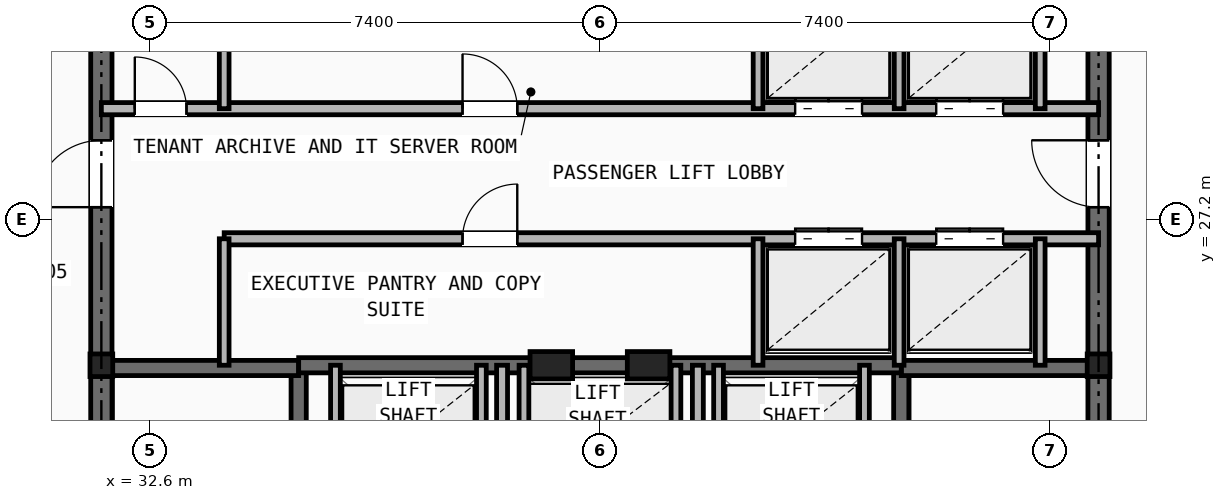
"""IFC4 building model, lengths in metres.
Left out: names, types, materials, properties, quantities, classifications, styles, units other than length and angle.
Written with IfcOpenShell. Run it as: python <this file> out.ifc"""

import sys

from ifc_helpers import new_model, si_unit, direction, frame, frame_2d, origin, origin_2d, place, context, subcontext, project, spatial, rectangle, i_section, extrude, element, fill, save


model = new_model("IFC4")
c1 = context("Model", 3, precision=1e-05, world=origin(), true_north=direction((0.0, 1.0)))
c2 = subcontext(c1, "Body", "Model", "MODEL_VIEW")
j1 = project(units=[si_unit("LENGTHUNIT", "METRE"), si_unit("PLANEANGLEUNIT", "RADIAN")], contexts=[c1])
p1 = place(None, origin())
s1 = spatial("IfcSite", under=j1, at=p1, CompositionType="ELEMENT")
p2 = place(p1, origin())
s2 = spatial("IfcBuilding", under=s1, at=p2, CompositionType="ELEMENT")
p3 = place(p2, frame((0.0, 0.0, 283.0)))
s3 = spatial("IfcBuildingStorey", under=s2, at=p3, CompositionType="ELEMENT", Elevation=283.0)
for number, where, z_axis, x_axis in (
    (1, (31.8, 24.8, 0.0), (0.0, 0.0, 1.0), (1.0, 0.0, 0.0)),
    (2, (48.2, 24.8, 0.0), (0.0, 0.0, 1.0), (1.0, 0.0, 0.0)),
):
    element("IfcColumn", number, at=place(p3, frame(where, z_axis=z_axis, x_axis=x_axis)), inside=s3, PredefinedType="COLUMN", context=c2, shape_type="SweptSolid", body=[
        extrude(i_section(OverallWidth=0.374, OverallDepth=0.372, WebThickness=0.016, FlangeThickness=0.026, at=origin_2d()), origin(), (0.0, 0.0, 1.0), 3.5),
    ])
for number, where, z_axis, x_axis in (
    (3, (39.2, 24.8, 0.0), (0.0, 0.0, 1.0), (1.0, 0.0, 0.0)),
    (4, (40.8, 24.8, 0.0), (0.0, 0.0, 1.0), (1.0, 0.0, 0.0)),
):
    element("IfcColumn", number, at=place(p3, frame(where, z_axis=z_axis, x_axis=x_axis)), inside=s3, PredefinedType="PILASTER", context=c2, shape_type="SweptSolid", body=[
        extrude(rectangle(XDim=0.7, YDim=0.45, at=origin_2d()), origin(), (0.0, 0.0, 1.0), 3.5),
    ])
p4 = place(p3, frame((31.8, 16.4, 0.0), z_axis=(0.0, 0.0, 1.0), x_axis=(0.0, 1.0, 0.0)))
e5 = element("IfcWall", 5, at=p4, inside=s3, PredefinedType="SHEAR", context=c2, shape_type="SweptSolid", body=[
    extrude(rectangle(XDim=14.8, YDim=0.35, at=frame_2d((7.4, 0.0))), origin(), (0.0, 0.0, 1.0), 3.25),
])
p5 = place(p4, frame((11.0, 0.0, 0.0)))
e6 = element("IfcOpeningElement", 6, at=p5, cuts=e5, PredefinedType="OPENING", context=c2, shape_type="SweptSolid", body=[
    extrude(rectangle(XDim=1.1, YDim=2.15, at=frame_2d((0.55, 1.075))), frame((0.0, 0.185, 0.0), z_axis=(0.0, -1.0, 0.0), x_axis=(1.0, 0.0, 0.0)), (0.0, 0.0, 1.0), 0.37),
])
p6 = place(p3, frame((48.2, 16.4, 0.0), z_axis=(0.0, 0.0, 1.0), x_axis=(0.0, 1.0, 0.0)))
e7 = element("IfcWall", 7, at=p6, inside=s3, PredefinedType="SHEAR", context=c2, shape_type="SweptSolid", body=[
    extrude(rectangle(XDim=14.8, YDim=0.35, at=frame_2d((7.4, 0.0))), origin(), (0.0, 0.0, 1.0), 3.25),
])
p7 = place(p6, frame((11.0, 0.0, 0.0)))
e8 = element("IfcOpeningElement", 8, at=p7, cuts=e7, PredefinedType="OPENING", context=c2, shape_type="SweptSolid", body=[
    extrude(rectangle(XDim=1.1, YDim=2.15, at=frame_2d((0.55, 1.075))), frame((0.0, 0.185, 0.0), z_axis=(0.0, -1.0, 0.0), x_axis=(1.0, 0.0, 0.0)), (0.0, 0.0, 1.0), 0.37),
])
p8 = place(p3, frame((35.045, 16.4, 0.0), z_axis=(0.0, 0.0, 1.0), x_axis=(0.0, 1.0, 0.0)))
e9 = element("IfcWall", 9, at=p8, inside=s3, PredefinedType="SHEAR", context=c2, shape_type="SweptSolid", body=[
    extrude(rectangle(XDim=8.4, YDim=0.25, at=frame_2d((4.2, 0.0))), origin(), (0.0, 0.0, 1.0), 3.25),
])
p9 = place(p8, frame((0.45, 0.0, 0.0)))
e10 = element("IfcOpeningElement", 10, at=p9, cuts=e9, PredefinedType="OPENING", context=c2, shape_type="SweptSolid", body=[
    extrude(rectangle(XDim=0.95, YDim=2.1, at=frame_2d((0.475, 1.05))), frame((0.0, 0.135, 0.0), z_axis=(0.0, -1.0, 0.0), x_axis=(1.0, 0.0, 0.0)), (0.0, 0.0, 1.0), 0.27),
])
p10 = place(p3, frame((31.8, 24.755, 0.0), z_axis=(0.0, 0.0, 1.0), x_axis=(1.0, 0.0, 0.0)))
e11 = element("IfcWall", 11, at=p10, inside=s3, PredefinedType="SHEAR", context=c2, shape_type="SweptSolid", body=[
    extrude(rectangle(XDim=3.245, YDim=0.25, at=frame_2d((1.623, 0.0))), origin(), (0.0, 0.0, 1.0), 3.25),
])
p11 = place(p3, frame((44.955, 16.4, 0.0), z_axis=(0.0, 0.0, 1.0), x_axis=(0.0, 1.0, 0.0)))
e12 = element("IfcWall", 12, at=p11, inside=s3, PredefinedType="SHEAR", context=c2, shape_type="SweptSolid", body=[
    extrude(rectangle(XDim=8.4, YDim=0.25, at=frame_2d((4.2, 0.0))), origin(), (0.0, 0.0, 1.0), 3.25),
])
p12 = place(p11, frame((0.45, 0.0, 0.0)))
e13 = element("IfcOpeningElement", 13, at=p12, cuts=e12, PredefinedType="OPENING", context=c2, shape_type="SweptSolid", body=[
    extrude(rectangle(XDim=0.95, YDim=2.1, at=frame_2d((0.475, 1.05))), frame((0.0, 0.135, 0.0), z_axis=(0.0, -1.0, 0.0), x_axis=(1.0, 0.0, 0.0)), (0.0, 0.0, 1.0), 0.27),
])
p13 = place(p3, frame((44.955, 24.755, 0.0), z_axis=(0.0, 0.0, 1.0), x_axis=(1.0, 0.0, 0.0)))
e14 = element("IfcWall", 14, at=p13, inside=s3, PredefinedType="SHEAR", context=c2, shape_type="SweptSolid", body=[
    extrude(rectangle(XDim=3.245, YDim=0.25, at=frame_2d((1.623, 0.0))), origin(), (0.0, 0.0, 1.0), 3.25),
])
p14 = place(p3, frame((35.045, 24.8, 0.0), z_axis=(0.0, 0.0, 1.0), x_axis=(1.0, 0.0, 0.0)))
e15 = element("IfcWall", 15, at=p14, inside=s3, PredefinedType="SHEAR", context=c2, shape_type="SweptSolid", body=[
    extrude(rectangle(XDim=9.91, YDim=0.25, at=frame_2d((4.955, 0.0))), origin(), (0.0, 0.0, 1.0), 3.25),
])
p15 = place(p3, frame((38.39, 16.4, 0.0), z_axis=(0.0, 0.0, 1.0), x_axis=(0.0, 1.0, 0.0)))
e16 = element("IfcWall", 16, at=p15, inside=s3, PredefinedType="PARTITIONING", context=c2, shape_type="SweptSolid", body=[
    extrude(rectangle(XDim=8.4, YDim=0.18, at=frame_2d((4.2, 0.0))), origin(), (0.0, 0.0, 1.0), 2.978),
])
p16 = place(p15, frame((3.8, 0.0, 0.0)))
e17 = element("IfcOpeningElement", 17, at=p16, cuts=e16, PredefinedType="OPENING", context=c2, shape_type="SweptSolid", body=[
    extrude(rectangle(XDim=0.95, YDim=2.1, at=frame_2d((0.475, 1.05))), frame((0.0, 0.1, 0.0), z_axis=(0.0, -1.0, 0.0), x_axis=(1.0, 0.0, 0.0)), (0.0, 0.0, 1.0), 0.2),
])
p17 = place(p3, frame((41.61, 16.4, 0.0), z_axis=(0.0, 0.0, 1.0), x_axis=(0.0, 1.0, 0.0)))
e18 = element("IfcWall", 18, at=p17, inside=s3, PredefinedType="PARTITIONING", context=c2, shape_type="SweptSolid", body=[
    extrude(rectangle(XDim=8.4, YDim=0.18, at=frame_2d((4.2, 0.0))), origin(), (0.0, 0.0, 1.0), 2.978),
])
for number, where, z_axis, x_axis in (
    (19, (35.65, 22.48, 0.0), (0.0, 0.0, 1.0), (0.0, 1.0, 0.0)),
    (20, (38.05, 22.48, 0.0), (0.0, 0.0, 1.0), (0.0, 1.0, 0.0)),
    (21, (41.95, 22.48, 0.0), (0.0, 0.0, 1.0), (0.0, 1.0, 0.0)),
    (22, (44.35, 22.48, 0.0), (0.0, 0.0, 1.0), (0.0, 1.0, 0.0)),
    (23, (38.75, 22.48, 0.0), (0.0, 0.0, 1.0), (0.0, 1.0, 0.0)),
    (24, (41.25, 22.48, 0.0), (0.0, 0.0, 1.0), (0.0, 1.0, 0.0)),
):
    element("IfcWall", number, at=place(p3, frame(where, z_axis=z_axis, x_axis=x_axis)), inside=s3, PredefinedType="SOLIDWALL", context=c2, shape_type="SweptSolid", body=[
        extrude(rectangle(XDim=2.32, YDim=0.16, at=frame_2d((1.16, 0.0))), origin(), (0.0, 0.0, 1.0), 3.25),
    ])
p18 = place(p3, frame((31.8, 29.02, 0.0), z_axis=(0.0, 0.0, 1.0), x_axis=(1.0, 0.0, 0.0)))
e25 = element("IfcWall", 25, at=p18, inside=s3, PredefinedType="SOLIDWALL", context=c2, shape_type="SweptSolid", body=[
    extrude(rectangle(XDim=16.4, YDim=0.2, at=frame_2d((8.2, 0.0))), origin(), (0.0, 0.0, 1.0), 2.705),
])
p19 = place(p18, frame((0.55, 0.0, 0.0)))
e26 = element("IfcOpeningElement", 26, at=p19, cuts=e25, PredefinedType="OPENING", context=c2, shape_type="SweptSolid", body=[
    extrude(rectangle(XDim=0.85, YDim=2.05, at=frame_2d((0.425, 1.025))), frame((0.0, 0.11, 0.0), z_axis=(0.0, -1.0, 0.0), x_axis=(1.0, 0.0, 0.0)), (0.0, 0.0, 1.0), 0.22),
])
p20 = place(p18, frame((5.94, 0.0, 0.0)))
e27 = element("IfcOpeningElement", 27, at=p20, cuts=e25, PredefinedType="OPENING", context=c2, shape_type="SweptSolid", body=[
    extrude(rectangle(XDim=0.9, YDim=2.1, at=frame_2d((0.45, 1.05))), frame((0.0, 0.11, 0.0), z_axis=(0.0, -1.0, 0.0), x_axis=(1.0, 0.0, 0.0)), (0.0, 0.0, 1.0), 0.22),
])
p21 = place(p18, frame((11.41, 0.0, 0.0)))
e28 = element("IfcOpeningElement", 28, at=p21, cuts=e25, PredefinedType="OPENING", context=c2, shape_type="SweptSolid", body=[
    extrude(rectangle(XDim=1.1, YDim=2.15, at=frame_2d((0.55, 1.075))), frame((0.0, 0.11, 0.0), z_axis=(0.0, -1.0, 0.0), x_axis=(1.0, 0.0, 0.0)), (0.0, 0.0, 1.0), 0.22),
])
p22 = place(p18, frame((13.73, 0.0, 0.0)))
e29 = element("IfcOpeningElement", 29, at=p22, cuts=e25, PredefinedType="OPENING", context=c2, shape_type="SweptSolid", body=[
    extrude(rectangle(XDim=1.1, YDim=2.15, at=frame_2d((0.55, 1.075))), frame((0.0, 0.11, 0.0), z_axis=(0.0, -1.0, 0.0), x_axis=(1.0, 0.0, 0.0)), (0.0, 0.0, 1.0), 0.22),
])
p23 = place(p3, frame((33.82, 26.88, 0.0), z_axis=(0.0, 0.0, 1.0), x_axis=(1.0, 0.0, 0.0)))
e30 = element("IfcWall", 30, at=p23, inside=s3, PredefinedType="SOLIDWALL", context=c2, shape_type="SweptSolid", body=[
    extrude(rectangle(XDim=14.38, YDim=0.2, at=frame_2d((7.19, 0.0))), origin(), (0.0, 0.0, 1.0), 2.705),
])
p24 = place(p23, frame((3.92, 0.0, 0.0)))
e31 = element("IfcOpeningElement", 31, at=p24, cuts=e30, PredefinedType="OPENING", context=c2, shape_type="SweptSolid", body=[
    extrude(rectangle(XDim=0.9, YDim=2.1, at=frame_2d((0.45, 1.05))), frame((0.0, 0.11, 0.0), z_axis=(0.0, -1.0, 0.0), x_axis=(1.0, 0.0, 0.0)), (0.0, 0.0, 1.0), 0.22),
])
p25 = place(p23, frame((9.39, 0.0, 0.0)))
e32 = element("IfcOpeningElement", 32, at=p25, cuts=e30, PredefinedType="OPENING", context=c2, shape_type="SweptSolid", body=[
    extrude(rectangle(XDim=1.1, YDim=2.15, at=frame_2d((0.55, 1.075))), frame((0.0, 0.11, 0.0), z_axis=(0.0, -1.0, 0.0), x_axis=(1.0, 0.0, 0.0)), (0.0, 0.0, 1.0), 0.22),
])
p26 = place(p23, frame((11.71, 0.0, 0.0)))
e33 = element("IfcOpeningElement", 33, at=p26, cuts=e30, PredefinedType="OPENING", context=c2, shape_type="SweptSolid", body=[
    extrude(rectangle(XDim=1.1, YDim=2.15, at=frame_2d((0.55, 1.075))), frame((0.0, 0.11, 0.0), z_axis=(0.0, -1.0, 0.0), x_axis=(1.0, 0.0, 0.0)), (0.0, 0.0, 1.0), 0.22),
])
p27 = place(p3, frame((33.82, 29.02, 0.0), z_axis=(0.0, 0.0, 1.0), x_axis=(0.0, 1.0, 0.0)))
e34 = element("IfcWall", 34, at=p27, inside=s3, PredefinedType="SOLIDWALL", context=c2, shape_type="SweptSolid", body=[
    extrude(rectangle(XDim=2.18, YDim=0.16, at=frame_2d((1.09, 0.0))), origin(), (0.0, 0.0, 1.0), 2.978),
])
p28 = place(p3, frame((33.82, 24.8, 0.0), z_axis=(0.0, 0.0, 1.0), x_axis=(0.0, 1.0, 0.0)))
e35 = element("IfcWall", 35, at=p28, inside=s3, PredefinedType="SOLIDWALL", context=c2, shape_type="SweptSolid", body=[
    extrude(rectangle(XDim=2.08, YDim=0.16, at=frame_2d((1.04, 0.0))), origin(), (0.0, 0.0, 1.0), 3.25),
])
for number, where, z_axis, x_axis in (
    (36, (42.6, 29.02, 0.0), (0.0, 0.0, 1.0), (0.0, 1.0, 0.0)),
    (37, (44.92, 29.02, 0.0), (0.0, 0.0, 1.0), (0.0, 1.0, 0.0)),
    (38, (47.24, 29.02, 0.0), (0.0, 0.0, 1.0), (0.0, 1.0, 0.0)),
):
    element("IfcWall", number, at=place(p3, frame(where, z_axis=z_axis, x_axis=x_axis)), inside=s3, PredefinedType="SOLIDWALL", context=c2, shape_type="SweptSolid", body=[
        extrude(rectangle(XDim=2.18, YDim=0.16, at=frame_2d((1.09, 0.0))), origin(), (0.0, 0.0, 1.0), 2.978),
    ])
for number, where, z_axis, x_axis in (
    (39, (42.6, 24.8, 0.0), (0.0, 0.0, 1.0), (0.0, 1.0, 0.0)),
    (40, (44.92, 24.8, 0.0), (0.0, 0.0, 1.0), (0.0, 1.0, 0.0)),
    (41, (47.24, 24.8, 0.0), (0.0, 0.0, 1.0), (0.0, 1.0, 0.0)),
):
    element("IfcWall", number, at=place(p3, frame(where, z_axis=z_axis, x_axis=x_axis)), inside=s3, PredefinedType="SOLIDWALL", context=c2, shape_type="SweptSolid", body=[
        extrude(rectangle(XDim=2.08, YDim=0.16, at=frame_2d((1.04, 0.0))), origin(), (0.0, 0.0, 1.0), 3.25),
    ])
p29 = place(p19, origin())
e42 = element("IfcDoor", 42, at=p29, inside=s3, OperationType="SINGLE_SWING_LEFT", PredefinedType="DOOR", context=c2, shape_type="SweptSolid", body=[
    extrude(rectangle(XDim=0.85, YDim=2.05, at=frame_2d((0.425, 1.025))), frame((0.0, 0.025, 0.0), z_axis=(0.0, -1.0, 0.0), x_axis=(1.0, 0.0, 0.0)), (0.0, 0.0, 1.0), 0.05),
])
fill(e26, e42)
p30 = place(p5, origin())
e43 = element("IfcDoor", 43, at=p30, inside=s3, OperationType="SINGLE_SWING_LEFT", PredefinedType="DOOR", context=c2, shape_type="SweptSolid", body=[
    extrude(rectangle(XDim=1.1, YDim=2.15, at=frame_2d((0.55, 1.075))), frame((0.0, 0.025, 0.0), z_axis=(0.0, -1.0, 0.0), x_axis=(1.0, 0.0, 0.0)), (0.0, 0.0, 1.0), 0.05),
])
fill(e6, e43)
p31 = place(p7, origin())
e44 = element("IfcDoor", 44, at=p31, inside=s3, OperationType="SINGLE_SWING_RIGHT", PredefinedType="DOOR", context=c2, shape_type="SweptSolid", body=[
    extrude(rectangle(XDim=1.1, YDim=2.15, at=frame_2d((0.55, 1.075))), frame((0.0, 0.025, 0.0), z_axis=(0.0, -1.0, 0.0), x_axis=(1.0, 0.0, 0.0)), (0.0, 0.0, 1.0), 0.05),
])
fill(e8, e44)
p32 = place(p20, origin())
e45 = element("IfcDoor", 45, at=p32, inside=s3, OperationType="SINGLE_SWING_LEFT", PredefinedType="DOOR", context=c2, shape_type="SweptSolid", body=[
    extrude(rectangle(XDim=0.9, YDim=2.1, at=frame_2d((0.45, 1.05))), frame((0.0, 0.025, 0.0), z_axis=(0.0, -1.0, 0.0), x_axis=(1.0, 0.0, 0.0)), (0.0, 0.0, 1.0), 0.05),
])
fill(e27, e45)
p33 = place(p24, origin())
e46 = element("IfcDoor", 46, at=p33, inside=s3, OperationType="SINGLE_SWING_RIGHT", PredefinedType="DOOR", context=c2, shape_type="SweptSolid", body=[
    extrude(rectangle(XDim=0.9, YDim=2.1, at=frame_2d((0.45, 1.05))), frame((0.0, 0.025, 0.0), z_axis=(0.0, -1.0, 0.0), x_axis=(1.0, 0.0, 0.0)), (0.0, 0.0, 1.0), 0.05),
])
fill(e31, e46)
p34 = place(p21, origin())
e47 = element("IfcDoor", 47, at=p34, inside=s3, OperationType="DOUBLE_DOOR_SLIDING", PredefinedType="DOOR", context=c2, shape_type="SweptSolid", body=[
    extrude(rectangle(XDim=1.1, YDim=2.15, at=frame_2d((0.55, 1.075))), frame((0.0, 0.025, 0.0), z_axis=(0.0, -1.0, 0.0), x_axis=(1.0, 0.0, 0.0)), (0.0, 0.0, 1.0), 0.05),
])
fill(e28, e47)
p35 = place(p22, origin())
e48 = element("IfcDoor", 48, at=p35, inside=s3, OperationType="DOUBLE_DOOR_SLIDING", PredefinedType="DOOR", context=c2, shape_type="SweptSolid", body=[
    extrude(rectangle(XDim=1.1, YDim=2.15, at=frame_2d((0.55, 1.075))), frame((0.0, 0.025, 0.0), z_axis=(0.0, -1.0, 0.0), x_axis=(1.0, 0.0, 0.0)), (0.0, 0.0, 1.0), 0.05),
])
fill(e29, e48)
p36 = place(p25, origin())
e49 = element("IfcDoor", 49, at=p36, inside=s3, OperationType="DOUBLE_DOOR_SLIDING", PredefinedType="DOOR", context=c2, shape_type="SweptSolid", body=[
    extrude(rectangle(XDim=1.1, YDim=2.15, at=frame_2d((0.55, 1.075))), frame((0.0, 0.025, 0.0), z_axis=(0.0, -1.0, 0.0), x_axis=(1.0, 0.0, 0.0)), (0.0, 0.0, 1.0), 0.05),
])
fill(e32, e49)
p37 = place(p26, origin())
e50 = element("IfcDoor", 50, at=p37, inside=s3, OperationType="DOUBLE_DOOR_SLIDING", PredefinedType="DOOR", context=c2, shape_type="SweptSolid", body=[
    extrude(rectangle(XDim=1.1, YDim=2.15, at=frame_2d((0.55, 1.075))), frame((0.0, 0.025, 0.0), z_axis=(0.0, -1.0, 0.0), x_axis=(1.0, 0.0, 0.0)), (0.0, 0.0, 1.0), 0.05),
])
fill(e33, e50)
save(model, sys.argv[1])
